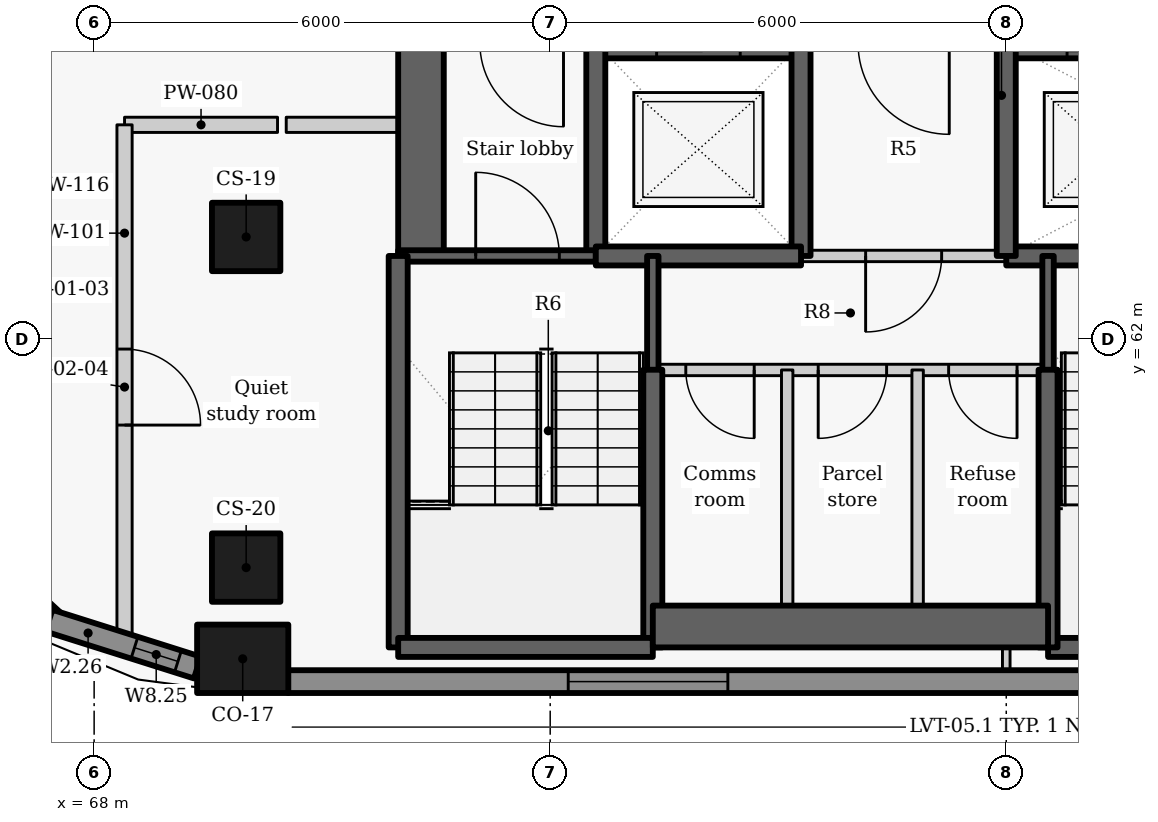
"""IFC4 building model, lengths in metres.
Left out: names, types, materials, properties, quantities, classifications, styles, units other than length and angle.
Written with IfcOpenShell. Run it as: python <this file> out.ifc"""

import sys

from ifc_helpers import new_model, si_unit, direction, frame, frame_2d, origin, origin_2d, place, context, subcontext, project, spatial, rectangle, extrude, element, fill, save


model = new_model("IFC4")
c1 = context("Model", 3, precision=1e-05, world=origin(), true_north=direction((0.0, 1.0)))
c2 = subcontext(c1, "Body", "Model", "MODEL_VIEW")
j1 = project(units=[si_unit("LENGTHUNIT", "METRE"), si_unit("PLANEANGLEUNIT", "RADIAN")], contexts=[c1])
p1 = place(None, origin())
s1 = spatial("IfcSite", under=j1, at=p1, CompositionType="ELEMENT")
p2 = place(p1, origin())
s2 = spatial("IfcBuilding", under=s1, at=p2, CompositionType="ELEMENT")
p3 = place(p2, frame((0.0, 0.0, 203.1)))
s3 = spatial("IfcBuildingStorey", under=s2, at=p3, CompositionType="ELEMENT", Elevation=203.1)
p4 = place(p3, frame((69.955, 57.8, 0.0), z_axis=(0.0, 0.0, 1.0), x_axis=(1.0, 0.0, 0.0)))
e1 = element("IfcColumn", 1, at=p4, inside=s3, PredefinedType="COLUMN", context=c2, shape_type="SweptSolid", body=[
    extrude(rectangle(XDim=1.2, YDim=0.9, at=origin_2d()), origin(), (0.0, 0.0, 1.0), 3.3),
])
for number, where, z_axis, x_axis in (
    (2, (70.0, 63.35, 0.0), (0.0, 0.0, 1.0), (0.0, -1.0, 0.0)),
    (3, (70.0, 59.0, 0.0), (0.0, 0.0, 1.0), (0.0, -1.0, 0.0)),
):
    element("IfcColumn", number, at=place(p3, frame(where, z_axis=z_axis, x_axis=x_axis)), inside=s3, PredefinedType="COLUMN", context=c2, shape_type="SweptSolid", body=[
        extrude(rectangle(XDim=0.9, YDim=0.9, at=origin_2d()), origin(), (0.0, 0.0, 1.0), 3.3),
    ])
p5 = place(p3, frame((66.022, 59.622, 0.0), z_axis=(0.0, 0.0, 1.0), x_axis=(0.734627852992, -0.678470277616, 0.0)))
e4 = element("IfcWall", 4, at=p5, inside=s3, PredefinedType="SOLIDWALL", context=c2, shape_type="SweptSolid", body=[
    extrude(rectangle(XDim=2.026, YDim=0.3, at=frame_2d((1.013, 0.0))), origin(), (0.0, 0.0, 1.0), 2.425),
])
p6 = place(p3, frame((67.406, 58.302, 0.0), z_axis=(0.0, 0.0, 1.0), x_axis=(0.953537608367, -0.301274010545, 0.0)))
e5 = element("IfcWall", 5, at=p6, inside=s3, PredefinedType="SOLIDWALL", context=c2, shape_type="SweptSolid", body=[
    extrude(rectangle(XDim=2.048, YDim=0.3, at=frame_2d((1.024, 0.0))), origin(), (0.0, 0.0, 1.0), 2.425),
])
p7 = place(p6, frame((1.18, 0.0, 0.9)))
e6 = element("IfcOpeningElement", 6, at=p7, cuts=e5, PredefinedType="OPENING", context=c2, shape_type="SweptSolid", body=[
    extrude(rectangle(XDim=0.6, YDim=1.1, at=frame_2d((0.3, 0.55))), frame((0.0, 0.16, 0.0), z_axis=(0.0, -1.0, 0.0), x_axis=(1.0, 0.0, 0.0)), (0.0, 0.0, 1.0), 0.32),
])
p8 = place(p3, frame((70.551, 57.5, 0.0), z_axis=(0.0, 0.0, 1.0), x_axis=(1.0, 0.0, 0.0)))
e7 = element("IfcWall", 7, at=p8, inside=s3, PredefinedType="SOLIDWALL", context=c2, shape_type="SweptSolid", body=[
    extrude(rectangle(XDim=18.893, YDim=0.3, at=frame_2d((9.446, 0.0))), origin(), (0.0, 0.0, 1.0), 2.425),
])
p9 = place(p8, frame((3.687, 0.0, 0.9)))
e8 = element("IfcOpeningElement", 8, at=p9, cuts=e7, PredefinedType="OPENING", context=c2, shape_type="SweptSolid", body=[
    extrude(rectangle(XDim=2.1, YDim=1.1, at=frame_2d((1.05, 0.55))), frame((0.0, 0.16, 0.0), z_axis=(0.0, -1.0, 0.0), x_axis=(1.0, 0.0, 0.0)), (0.0, 0.0, 1.0), 0.32),
])
p10 = place(p8, frame((13.109, 0.0, 0.9)))
e9 = element("IfcOpeningElement", 9, at=p10, cuts=e7, PredefinedType="OPENING", context=c2, shape_type="SweptSolid", body=[
    extrude(rectangle(XDim=2.1, YDim=1.1, at=frame_2d((1.05, 0.55))), frame((0.0, 0.16, 0.0), z_axis=(0.0, -1.0, 0.0), x_axis=(1.0, 0.0, 0.0)), (0.0, 0.0, 1.0), 0.32),
])
p11 = place(p3, frame((72.3, 63.1, -0.275), z_axis=(0.0, 0.0, 1.0), x_axis=(0.0, 1.0, 0.0)))
e10 = element("IfcWall", 10, at=p11, inside=s3, PredefinedType="SHEAR", context=c2, shape_type="SweptSolid", body=[
    extrude(rectangle(XDim=9.1, YDim=0.6, at=frame_2d((4.55, 0.0))), origin(), (0.0, 0.0, 1.0), 3.3),
])
p12 = place(p11, frame((3.748, 0.0, 0.275)))
e11 = element("IfcOpeningElement", 11, at=p12, cuts=e10, PredefinedType="OPENING", context=c2, shape_type="SweptSolid", body=[
    extrude(rectangle(XDim=1.5, YDim=2.1, at=frame_2d((0.75, 1.05))), frame((0.0, 0.31, 0.0), z_axis=(0.0, -1.0, 0.0), x_axis=(1.0, 0.0, 0.0)), (0.0, 0.0, 1.0), 0.62),
])
p13 = place(p3, frame((74.597, 65.9, -0.275), z_axis=(0.0, 0.0, 1.0), x_axis=(1.0, 0.0, 0.0)))
e12 = element("IfcWall", 12, at=p13, inside=s3, PredefinedType="SHEAR", context=c2, shape_type="SweptSolid", body=[
    extrude(rectangle(XDim=2.706, YDim=0.4, at=frame_2d((1.353, 0.0))), origin(), (0.0, 0.0, 1.0), 3.3),
])
p14 = place(p13, frame((0.803, 0.0, 0.275)))
e13 = element("IfcOpeningElement", 13, at=p14, cuts=e12, PredefinedType="OPENING", context=c2, shape_type="SweptSolid", body=[
    extrude(rectangle(XDim=1.1, YDim=2.1, at=frame_2d((0.55, 1.05))), frame((0.0, 0.21, 0.0), z_axis=(0.0, -1.0, 0.0), x_axis=(1.0, 0.0, 0.0)), (0.0, 0.0, 1.0), 0.42),
])
p15 = place(p3, frame((79.997, 65.9, -0.275), z_axis=(0.0, 0.0, 1.0), x_axis=(1.0, 0.0, 0.0)))
e14 = element("IfcWall", 14, at=p15, inside=s3, PredefinedType="SHEAR", context=c2, shape_type="SweptSolid", body=[
    extrude(rectangle(XDim=5.406, YDim=0.4, at=frame_2d((2.703, 0.0))), origin(), (0.0, 0.0, 1.0), 3.3),
])
p16 = place(p15, frame((0.803, 0.0, 0.275)))
e15 = element("IfcOpeningElement", 15, at=p16, cuts=e14, PredefinedType="OPENING", context=c2, shape_type="SweptSolid", body=[
    extrude(rectangle(XDim=1.1, YDim=2.1, at=frame_2d((0.55, 1.05))), frame((0.0, 0.21, 0.0), z_axis=(0.0, -1.0, 0.0), x_axis=(1.0, 0.0, 0.0)), (0.0, 0.0, 1.0), 0.42),
])
p17 = place(p3, frame((74.6, 63.1, -0.275), z_axis=(0.0, 0.0, 1.0), x_axis=(0.0, 1.0, 0.0)))
e16 = element("IfcWall", 16, at=p17, inside=s3, PredefinedType="SHEAR", context=c2, shape_type="SweptSolid", body=[
    extrude(rectangle(XDim=2.8, YDim=0.25, at=frame_2d((1.4, 0.0))), origin(), (0.0, 0.0, 1.0), 3.3),
])
p18 = place(p3, frame((72.0, 63.1, -0.275), z_axis=(0.0, 0.0, 1.0), x_axis=(1.0, 0.0, 0.0)))
e17 = element("IfcWall", 17, at=p18, inside=s3, PredefinedType="SHEAR", context=c2, shape_type="SweptSolid", body=[
    extrude(rectangle(XDim=2.6, YDim=0.15, at=frame_2d((1.3, 0.0))), origin(), (0.0, 0.0, 1.0), 3.3),
])
p19 = place(p18, frame((1.02, 0.0, 0.275)))
e18 = element("IfcOpeningElement", 18, at=p19, cuts=e17, PredefinedType="OPENING", context=c2, shape_type="SweptSolid", body=[
    extrude(rectangle(XDim=1.1, YDim=2.1, at=frame_2d((0.55, 1.05))), frame((0.0, 0.085, 0.0), z_axis=(0.0, -1.0, 0.0), x_axis=(1.0, 0.0, 0.0)), (0.0, 0.0, 1.0), 0.17),
])
p20 = place(p3, frame((77.3, 63.1, -0.275), z_axis=(0.0, 0.0, 1.0), x_axis=(0.0, 1.0, 0.0)))
e19 = element("IfcWall", 19, at=p20, inside=s3, PredefinedType="SHEAR", context=c2, shape_type="SweptSolid", body=[
    extrude(rectangle(XDim=2.8, YDim=0.25, at=frame_2d((1.4, 0.0))), origin(), (0.0, 0.0, 1.0), 3.3),
])
p21 = place(p3, frame((74.6, 63.1, -0.275), z_axis=(0.0, 0.0, 1.0), x_axis=(1.0, 0.0, 0.0)))
e20 = element("IfcWall", 20, at=p21, inside=s3, PredefinedType="SHEAR", context=c2, shape_type="SweptSolid", body=[
    extrude(rectangle(XDim=2.7, YDim=0.25, at=frame_2d((1.35, 0.0))), origin(), (0.0, 0.0, 1.0), 3.3),
])
p22 = place(p3, frame((80.0, 63.1, -0.275), z_axis=(0.0, 0.0, 1.0), x_axis=(1.0, 0.0, 0.0)))
e21 = element("IfcWall", 21, at=p22, inside=s3, PredefinedType="SHEAR", context=c2, shape_type="SweptSolid", body=[
    extrude(rectangle(XDim=8.0, YDim=0.25, at=frame_2d((4.0, 0.0))), origin(), (0.0, 0.0, 1.0), 3.3),
])
p23 = place(p22, frame((3.849, 0.0, 0.275)))
e22 = element("IfcOpeningElement", 22, at=p23, cuts=e21, PredefinedType="OPENING", context=c2, shape_type="SweptSolid", body=[
    extrude(rectangle(XDim=1.1, YDim=2.1, at=frame_2d((0.55, 1.05))), frame((0.0, 0.135, 0.0), z_axis=(0.0, -1.0, 0.0), x_axis=(1.0, 0.0, 0.0)), (0.0, 0.0, 1.0), 0.27),
])
p24 = place(p3, frame((80.0, 63.1, -0.275), z_axis=(0.0, 0.0, 1.0), x_axis=(0.0, 1.0, 0.0)))
e23 = element("IfcWall", 23, at=p24, inside=s3, PredefinedType="SHEAR", context=c2, shape_type="SweptSolid", body=[
    extrude(rectangle(XDim=2.8, YDim=0.25, at=frame_2d((1.4, 0.0))), origin(), (0.0, 0.0, 1.0), 3.3),
])
p25 = place(p3, frame((80.0, 63.1, 0.0), z_axis=(0.0, 0.0, 1.0), x_axis=(-1.0, 0.0, 0.0)))
e24 = element("IfcWall", 24, at=p25, inside=s3, PredefinedType="PARTITIONING", context=c2, shape_type="SweptSolid", body=[
    extrude(rectangle(XDim=2.7, YDim=0.15, at=frame_2d((1.35, 0.0))), origin(), (0.0, 0.0, 1.0), 3.025),
])
p26 = place(p25, frame((0.85, 0.0, 0.0)))
e25 = element("IfcOpeningElement", 25, at=p26, cuts=e24, PredefinedType="OPENING", context=c2, shape_type="SweptSolid", body=[
    extrude(rectangle(XDim=1.0, YDim=2.1, at=frame_2d((0.5, 1.05))), frame((0.0, 0.085, 0.0), z_axis=(0.0, -1.0, 0.0), x_axis=(1.0, 0.0, 0.0)), (0.0, 0.0, 1.0), 0.17),
])
p27 = place(p3, frame((75.35, 61.597, -0.275), z_axis=(0.0, 0.0, 1.0), x_axis=(0.0, 1.0, 0.0)))
e26 = element("IfcWall", 26, at=p27, inside=s3, PredefinedType="SHEAR", context=c2, shape_type="SweptSolid", body=[
    extrude(rectangle(XDim=1.503, YDim=0.15, at=frame_2d((0.751, 0.0))), origin(), (0.0, 0.0, 1.0), 3.3),
])
p28 = place(p3, frame((75.35, 57.95, -0.275), z_axis=(0.0, 0.0, 1.0), x_axis=(0.0, 1.0, 0.0)))
e27 = element("IfcWall", 27, at=p28, inside=s3, PredefinedType="SHEAR", context=c2, shape_type="SweptSolid", body=[
    extrude(rectangle(XDim=3.653, YDim=0.25, at=frame_2d((1.827, 0.0))), origin(), (0.0, 0.0, 1.0), 3.3),
])
p29 = place(p3, frame((72.0, 57.95, -0.275), z_axis=(0.0, 0.0, 1.0), x_axis=(0.0, 1.0, 0.0)))
e28 = element("IfcWall", 28, at=p29, inside=s3, PredefinedType="SHEAR", context=c2, shape_type="SweptSolid", body=[
    extrude(rectangle(XDim=5.15, YDim=0.25, at=frame_2d((2.575, 0.0))), origin(), (0.0, 0.0, 1.0), 3.3),
])
p30 = place(p3, frame((72.0, 57.95, -0.275), z_axis=(0.0, 0.0, 1.0), x_axis=(1.0, 0.0, 0.0)))
e29 = element("IfcWall", 29, at=p30, inside=s3, PredefinedType="SHEAR", context=c2, shape_type="SweptSolid", body=[
    extrude(rectangle(XDim=3.35, YDim=0.25, at=frame_2d((1.675, 0.0))), origin(), (0.0, 0.0, 1.0), 3.3),
])
p31 = place(p3, frame((80.55, 57.95, -0.275), z_axis=(0.0, 0.0, 1.0), x_axis=(1.0, 0.0, 0.0)))
e30 = element("IfcWall", 30, at=p31, inside=s3, PredefinedType="SHEAR", context=c2, shape_type="SweptSolid", body=[
    extrude(rectangle(XDim=2.85, YDim=0.25, at=frame_2d((1.425, 0.0))), origin(), (0.0, 0.0, 1.0), 3.3),
])
p32 = place(p3, frame((80.55, 61.597, -0.275), z_axis=(0.0, 0.0, 1.0), x_axis=(0.0, 1.0, 0.0)))
e31 = element("IfcWall", 31, at=p32, inside=s3, PredefinedType="SHEAR", context=c2, shape_type="SweptSolid", body=[
    extrude(rectangle(XDim=1.503, YDim=0.15, at=frame_2d((0.751, 0.0))), origin(), (0.0, 0.0, 1.0), 3.3),
])
p33 = place(p3, frame((80.55, 57.95, -0.275), z_axis=(0.0, 0.0, 1.0), x_axis=(0.0, 1.0, 0.0)))
e32 = element("IfcWall", 32, at=p33, inside=s3, PredefinedType="SHEAR", context=c2, shape_type="SweptSolid", body=[
    extrude(rectangle(XDim=3.653, YDim=0.25, at=frame_2d((1.827, 0.0))), origin(), (0.0, 0.0, 1.0), 3.3),
])
p34 = place(p3, frame((75.35, 58.225, -0.275), z_axis=(0.0, 0.0, 1.0), x_axis=(1.0, 0.0, 0.0)))
e33 = element("IfcWall", 33, at=p34, inside=s3, PredefinedType="SHEAR", context=c2, shape_type="SweptSolid", body=[
    extrude(rectangle(XDim=5.2, YDim=0.55, at=frame_2d((2.6, 0.0))), origin(), (0.0, 0.0, 1.0), 3.3),
])
p35 = place(p3, frame((80.55, 61.6, 0.0), z_axis=(0.0, 0.0, 1.0), x_axis=(-1.0, 0.0, 0.0)))
e34 = element("IfcWall", 34, at=p35, inside=s3, PredefinedType="PARTITIONING", context=c2, shape_type="SweptSolid", body=[
    extrude(rectangle(XDim=5.2, YDim=0.15, at=frame_2d((2.6, 0.0))), origin(), (0.0, 0.0, 1.0), 3.025),
])
p36 = place(p35, frame((3.866, 0.0, 0.0)))
e35 = element("IfcOpeningElement", 35, at=p36, cuts=e34, PredefinedType="OPENING", context=c2, shape_type="SweptSolid", body=[
    extrude(rectangle(XDim=0.9, YDim=2.1, at=frame_2d((0.45, 1.05))), frame((0.0, 0.085, 0.0), z_axis=(0.0, -1.0, 0.0), x_axis=(1.0, 0.0, 0.0)), (0.0, 0.0, 1.0), 0.17),
])
p37 = place(p35, frame((2.124, 0.0, 0.0)))
e36 = element("IfcOpeningElement", 36, at=p37, cuts=e34, PredefinedType="OPENING", context=c2, shape_type="SweptSolid", body=[
    extrude(rectangle(XDim=0.9, YDim=2.1, at=frame_2d((0.45, 1.05))), frame((0.0, 0.085, 0.0), z_axis=(0.0, -1.0, 0.0), x_axis=(1.0, 0.0, 0.0)), (0.0, 0.0, 1.0), 0.17),
])
p38 = place(p35, frame((0.408, 0.0, 0.0)))
e37 = element("IfcOpeningElement", 37, at=p38, cuts=e34, PredefinedType="OPENING", context=c2, shape_type="SweptSolid", body=[
    extrude(rectangle(XDim=0.9, YDim=2.1, at=frame_2d((0.45, 1.05))), frame((0.0, 0.085, 0.0), z_axis=(0.0, -1.0, 0.0), x_axis=(1.0, 0.0, 0.0)), (0.0, 0.0, 1.0), 0.17),
])
for number, where, z_axis, x_axis in (
    (38, (77.118, 57.95, 0.0), (0.0, 0.0, 1.0), (0.0, 1.0, 0.0)),
    (39, (78.834, 57.95, 0.0), (0.0, 0.0, 1.0), (0.0, 1.0, 0.0)),
):
    element("IfcWall", number, at=place(p3, frame(where, z_axis=z_axis, x_axis=x_axis)), inside=s3, PredefinedType="PARTITIONING", context=c2, shape_type="SweptSolid", body=[
        extrude(rectangle(XDim=3.65, YDim=0.15, at=frame_2d((1.825, 0.0))), origin(), (0.0, 0.0, 1.0), 3.025),
    ])
p39 = place(p3, frame((68.4, 64.825, 0.0), z_axis=(0.0, 0.0, 1.0), x_axis=(1.0, 0.0, 0.0)))
e40 = element("IfcWall", 40, at=p39, inside=s3, PredefinedType="PARTITIONING", context=c2, shape_type="SweptSolid", body=[
    extrude(rectangle(XDim=2.013, YDim=0.2, at=frame_2d((1.006, 0.0))), origin(), (0.0, 0.0, 1.0), 2.505),
])
p40 = place(p3, frame((70.527, 64.825, 0.0), z_axis=(0.0, 0.0, 1.0), x_axis=(1.0, 0.0, 0.0)))
e41 = element("IfcWall", 41, at=p40, inside=s3, PredefinedType="PARTITIONING", context=c2, shape_type="SweptSolid", body=[
    extrude(rectangle(XDim=1.473, YDim=0.2, at=frame_2d((0.736, 0.0))), origin(), (0.0, 0.0, 1.0), 3.025),
])
p41 = place(p3, frame((68.4, 64.825, 0.0), z_axis=(0.0, 0.0, 1.0), x_axis=(0.0, -1.0, 0.0)))
e42 = element("IfcWall", 42, at=p41, inside=s3, PredefinedType="PARTITIONING", context=c2, shape_type="SweptSolid", body=[
    extrude(rectangle(XDim=6.899, YDim=0.2, at=frame_2d((3.449, 0.0))), origin(), (0.0, 0.0, 1.0), 2.405),
])
p42 = place(p41, frame((2.95, 0.0, 0.0)))
e43 = element("IfcOpeningElement", 43, at=p42, cuts=e42, PredefinedType="OPENING", context=c2, shape_type="SweptSolid", body=[
    extrude(rectangle(XDim=1.0, YDim=2.1, at=frame_2d((0.5, 1.05))), frame((0.0, 0.11, 0.0), z_axis=(0.0, -1.0, 0.0), x_axis=(1.0, 0.0, 0.0)), (0.0, 0.0, 1.0), 0.22),
])
p43 = place(p3, frame((80.0, 57.65, 0.0), z_axis=(0.0, 0.0, 1.0), x_axis=(0.0, 1.0, 0.0)))
e44 = element("IfcWall", 44, at=p43, inside=s3, PredefinedType="PARTITIONING", context=c2, shape_type="SweptSolid", body=[
    extrude(rectangle(XDim=0.3, YDim=0.1, at=frame_2d((0.15, 0.0))), origin(), (0.0, 0.0, 1.0), 3.025),
])
p44 = place(p7, origin())
e45 = element("IfcWindow", 45, at=p44, inside=s3, PartitioningType="SINGLE_PANEL", PredefinedType="WINDOW", context=c2, shape_type="SweptSolid", body=[
    extrude(rectangle(XDim=0.6, YDim=1.1, at=frame_2d((0.3, 0.55))), frame((0.0, 0.03, 0.0), z_axis=(0.0, -1.0, 0.0), x_axis=(1.0, 0.0, 0.0)), (0.0, 0.0, 1.0), 0.06),
])
fill(e6, e45)
p45 = place(p9, origin())
e46 = element("IfcWindow", 46, at=p45, inside=s3, PartitioningType="SINGLE_PANEL", PredefinedType="WINDOW", context=c2, shape_type="SweptSolid", body=[
    extrude(rectangle(XDim=2.1, YDim=1.1, at=frame_2d((1.05, 0.55))), frame((0.0, 0.03, 0.0), z_axis=(0.0, -1.0, 0.0), x_axis=(1.0, 0.0, 0.0)), (0.0, 0.0, 1.0), 0.06),
])
fill(e8, e46)
p46 = place(p26, origin())
e47 = element("IfcDoor", 47, at=p46, inside=s3, OperationType="SINGLE_SWING_RIGHT", PredefinedType="DOOR", context=c2, shape_type="SweptSolid", body=[
    extrude(rectangle(XDim=1.0, YDim=2.1, at=frame_2d((0.5, 1.05))), frame((0.0, 0.025, 0.0), z_axis=(0.0, -1.0, 0.0), x_axis=(1.0, 0.0, 0.0)), (0.0, 0.0, 1.0), 0.05),
])
fill(e25, e47)
p47 = place(p36, origin())
e48 = element("IfcDoor", 48, at=p47, inside=s3, OperationType="SINGLE_SWING_LEFT", PredefinedType="DOOR", context=c2, shape_type="SweptSolid", body=[
    extrude(rectangle(XDim=0.9, YDim=2.1, at=frame_2d((0.45, 1.05))), frame((0.0, 0.025, 0.0), z_axis=(0.0, -1.0, 0.0), x_axis=(1.0, 0.0, 0.0)), (0.0, 0.0, 1.0), 0.05),
])
fill(e35, e48)
p48 = place(p37, origin())
e49 = element("IfcDoor", 49, at=p48, inside=s3, OperationType="SINGLE_SWING_RIGHT", PredefinedType="DOOR", context=c2, shape_type="SweptSolid", body=[
    extrude(rectangle(XDim=0.9, YDim=2.1, at=frame_2d((0.45, 1.05))), frame((0.0, 0.025, 0.0), z_axis=(0.0, -1.0, 0.0), x_axis=(1.0, 0.0, 0.0)), (0.0, 0.0, 1.0), 0.05),
])
fill(e36, e49)
p49 = place(p38, origin())
e50 = element("IfcDoor", 50, at=p49, inside=s3, OperationType="SINGLE_SWING_LEFT", PredefinedType="DOOR", context=c2, shape_type="SweptSolid", body=[
    extrude(rectangle(XDim=0.9, YDim=2.1, at=frame_2d((0.45, 1.05))), frame((0.0, 0.025, 0.0), z_axis=(0.0, -1.0, 0.0), x_axis=(1.0, 0.0, 0.0)), (0.0, 0.0, 1.0), 0.05),
])
fill(e37, e50)
p50 = place(p19, origin())
e51 = element("IfcDoor", 51, at=p50, inside=s3, OperationType="SINGLE_SWING_LEFT", PredefinedType="DOOR", context=c2, shape_type="SweptSolid", body=[
    extrude(rectangle(XDim=1.1, YDim=2.1, at=frame_2d((0.55, 1.05))), frame((0.0, 0.025, 0.0), z_axis=(0.0, -1.0, 0.0), x_axis=(1.0, 0.0, 0.0)), (0.0, 0.0, 1.0), 0.05),
])
fill(e18, e51)
p51 = place(p42, origin())
e52 = element("IfcDoor", 52, at=p51, inside=s3, OperationType="SINGLE_SWING_RIGHT", PredefinedType="DOOR", context=c2, shape_type="SweptSolid", body=[
    extrude(rectangle(XDim=1.0, YDim=2.1, at=frame_2d((0.5, 1.05))), frame((0.0, 0.025, 0.0), z_axis=(0.0, -1.0, 0.0), x_axis=(1.0, 0.0, 0.0)), (0.0, 0.0, 1.0), 0.05),
])
fill(e43, e52)
save(model, sys.argv[1])
